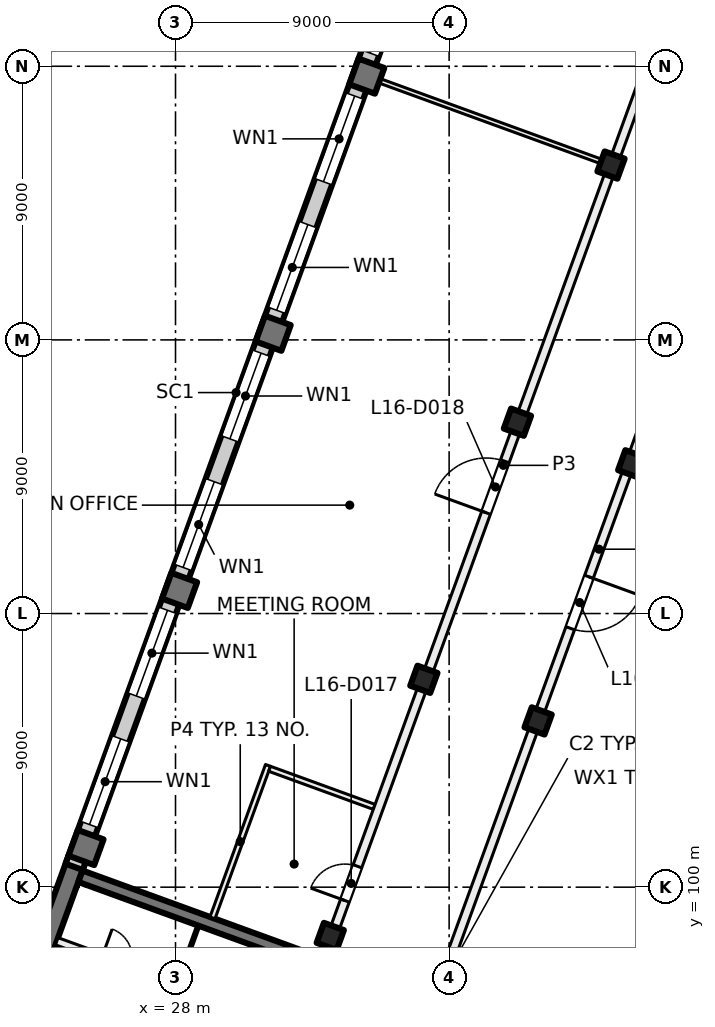
"""IFC4 building model, lengths in metres.
Left out: names, types, materials, properties, quantities, classifications, styles, units other than length and angle.
Written with IfcOpenShell. Run it as: python <this file> out.ifc"""

import sys

from ifc_helpers import new_model, si_unit, direction, frame, frame_2d, origin, origin_2d, place, context, subcontext, project, spatial, rectangle, extrude, element, fill, save


model = new_model("IFC4")
c1 = context("Model", 3, precision=1e-05, world=origin(), true_north=direction((0.0, 1.0)))
c2 = subcontext(c1, "Body", "Model", "MODEL_VIEW")
j1 = project(units=[si_unit("LENGTHUNIT", "METRE"), si_unit("PLANEANGLEUNIT", "RADIAN")], contexts=[c1])
p1 = place(None, origin())
s1 = spatial("IfcSite", under=j1, at=p1, CompositionType="ELEMENT")
p2 = place(p1, origin())
s2 = spatial("IfcBuilding", under=s1, at=p2, CompositionType="ELEMENT")
p3 = place(p2, frame((0.0, 0.0, 71.5)))
s3 = spatial("IfcBuildingStorey", under=s2, at=p3, CompositionType="ELEMENT", Elevation=71.5)
for number, where, z_axis, x_axis in (
    (1, (43.006, 113.925, 0.0), (0.0, 0.0, 1.0), (-0.342, -0.94, 0.0)),
    (2, (39.927, 105.468, 0.0), (0.0, 0.0, 1.0), (-0.342, -0.94, 0.0)),
    (3, (42.325, 123.751, 0.0), (0.0, 0.0, 1.0), (-0.342, -0.94, 0.0)),
    (4, (39.247, 115.293, 0.0), (0.0, 0.0, 1.0), (-0.342, -0.94, 0.0)),
    (5, (36.169, 106.836, 0.0), (0.0, 0.0, 1.0), (-0.342, -0.94, 0.0)),
    (6, (33.091, 98.379, 0.0), (0.0, 0.0, 1.0), (-0.342, -0.94, 0.0)),
):
    element("IfcColumn", number, at=place(p3, frame(where, z_axis=z_axis, x_axis=x_axis)), inside=s3, PredefinedType="COLUMN", context=c2, shape_type="SweptSolid", body=[
        extrude(rectangle(XDim=0.7, YDim=0.7, at=origin_2d()), origin(), (0.0, 0.0, 1.0), 4.0),
    ])
for number, where, z_axis, x_axis in (
    (7, (34.291, 126.675, 0.0), (0.0, 0.0, 1.0), (-0.342, -0.94, 0.0)),
    (8, (31.212, 118.218, 0.0), (0.0, 0.0, 1.0), (-0.342, -0.94, 0.0)),
    (9, (28.134, 109.76, 0.0), (0.0, 0.0, 1.0), (-0.342, -0.94, 0.0)),
    (10, (25.056, 101.303, 0.0), (0.0, 0.0, 1.0), (-0.342, -0.94, 0.0)),
):
    element("IfcColumn", number, at=place(p3, frame(where, z_axis=z_axis, x_axis=x_axis)), inside=s3, PredefinedType="COLUMN", context=c2, shape_type="SweptSolid", body=[
        extrude(rectangle(XDim=0.9, YDim=0.9, at=origin_2d()), origin(), (0.0, 0.0, 1.0), 4.0),
    ])
p4 = place(p3, frame((21.717, 92.568, 0.0), z_axis=(0.0, 0.0, 1.0), x_axis=(0.342016162452, 0.939694069696, 0.0)))
e11 = element("IfcWall", 11, at=p4, inside=s3, PredefinedType="SHEAR", context=c2, shape_type="SweptSolid", body=[
    extrude(rectangle(XDim=8.9, YDim=0.6, at=frame_2d((4.45, 0.0))), origin(), (0.0, 0.0, 1.0), 4.0),
])
p5 = place(p3, frame((32.953, 97.418, 0.0), z_axis=(0.0, 0.0, 1.0), x_axis=(-0.93969060187, 0.342025690201, 0.0)))
e12 = element("IfcWall", 12, at=p5, inside=s3, PredefinedType="SHEAR", context=c2, shape_type="SweptSolid", body=[
    extrude(rectangle(XDim=8.6, YDim=0.4, at=frame_2d((4.3, 0.0))), origin(), (0.0, 0.0, 1.0), 4.0),
])
p6 = place(p3, frame((24.666, 100.669, 0.0), z_axis=(0.0, 0.0, 1.0), x_axis=(0.34201964167, 0.939692803373, 0.0)))
e13 = element("IfcWall", 13, at=p6, inside=s3, PredefinedType="SOLIDWALL", context=c2, shape_type="SweptSolid", body=[
    extrude(rectangle(XDim=32.884, YDim=0.6, at=frame_2d((16.442, 0.0))), origin(), (0.0, 0.0, 1.0), 3.625),
])
p7 = place(p6, frame((1.48, 0.0, 0.9)))
e14 = element("IfcOpeningElement", 14, at=p7, cuts=e13, PredefinedType="OPENING", context=c2, shape_type="SweptSolid", body=[
    extrude(rectangle(XDim=3.0, YDim=2.4, at=frame_2d((1.5, 1.2))), frame((0.0, 0.31, 0.0), z_axis=(0.0, -1.0, 0.0), x_axis=(1.0, 0.0, 0.0)), (0.0, 0.0, 1.0), 0.62),
])
p8 = place(p6, frame((5.98, 0.0, 0.9)))
e15 = element("IfcOpeningElement", 15, at=p8, cuts=e13, PredefinedType="OPENING", context=c2, shape_type="SweptSolid", body=[
    extrude(rectangle(XDim=3.0, YDim=2.4, at=frame_2d((1.5, 1.2))), frame((0.0, 0.31, 0.0), z_axis=(0.0, -1.0, 0.0), x_axis=(1.0, 0.0, 0.0)), (0.0, 0.0, 1.0), 0.62),
])
p9 = place(p6, frame((10.48, 0.0, 0.9)))
e16 = element("IfcOpeningElement", 16, at=p9, cuts=e13, PredefinedType="OPENING", context=c2, shape_type="SweptSolid", body=[
    extrude(rectangle(XDim=3.0, YDim=2.4, at=frame_2d((1.5, 1.2))), frame((0.0, 0.31, 0.0), z_axis=(0.0, -1.0, 0.0), x_axis=(1.0, 0.0, 0.0)), (0.0, 0.0, 1.0), 0.62),
])
p10 = place(p6, frame((14.98, 0.0, 0.9)))
e17 = element("IfcOpeningElement", 17, at=p10, cuts=e13, PredefinedType="OPENING", context=c2, shape_type="SweptSolid", body=[
    extrude(rectangle(XDim=3.0, YDim=2.4, at=frame_2d((1.5, 1.2))), frame((0.0, 0.31, 0.0), z_axis=(0.0, -1.0, 0.0), x_axis=(1.0, 0.0, 0.0)), (0.0, 0.0, 1.0), 0.62),
])
p11 = place(p6, frame((19.48, 0.0, 0.9)))
e18 = element("IfcOpeningElement", 18, at=p11, cuts=e13, PredefinedType="OPENING", context=c2, shape_type="SweptSolid", body=[
    extrude(rectangle(XDim=3.0, YDim=2.4, at=frame_2d((1.5, 1.2))), frame((0.0, 0.31, 0.0), z_axis=(0.0, -1.0, 0.0), x_axis=(1.0, 0.0, 0.0)), (0.0, 0.0, 1.0), 0.62),
])
p12 = place(p6, frame((23.98, 0.0, 0.9)))
e19 = element("IfcOpeningElement", 19, at=p12, cuts=e13, PredefinedType="OPENING", context=c2, shape_type="SweptSolid", body=[
    extrude(rectangle(XDim=3.0, YDim=2.4, at=frame_2d((1.5, 1.2))), frame((0.0, 0.31, 0.0), z_axis=(0.0, -1.0, 0.0), x_axis=(1.0, 0.0, 0.0)), (0.0, 0.0, 1.0), 0.62),
])
p13 = place(p6, frame((28.48, 0.0, 0.9)))
e20 = element("IfcOpeningElement", 20, at=p13, cuts=e13, PredefinedType="OPENING", context=c2, shape_type="SweptSolid", body=[
    extrude(rectangle(XDim=3.0, YDim=2.4, at=frame_2d((1.5, 1.2))), frame((0.0, 0.31, 0.0), z_axis=(0.0, -1.0, 0.0), x_axis=(1.0, 0.0, 0.0)), (0.0, 0.0, 1.0), 0.62),
])
p14 = place(p3, frame((24.094, 98.221, 0.0), z_axis=(0.0, 0.0, 1.0), x_axis=(0.939691552312, -0.342023078919, 0.0)))
e21 = element("IfcWall", 21, at=p14, inside=s3, PredefinedType="PARTITIONING", context=c2, shape_type="SweptSolid", body=[
    extrude(rectangle(XDim=8.4, YDim=0.25, at=frame_2d((4.2, 0.0))), origin(), (0.0, 0.0, 1.0), 3.625),
])
p15 = place(p14, frame((5.925, 0.0, 0.0)))
e22 = element("IfcOpeningElement", 22, at=p15, cuts=e21, PredefinedType="OPENING", context=c2, shape_type="SweptSolid", body=[
    extrude(rectangle(XDim=0.8, YDim=2.1, at=frame_2d((0.4, 1.05))), frame((0.0, 0.135, 0.0), z_axis=(0.0, -1.0, 0.0), x_axis=(1.0, 0.0, 0.0)), (0.0, 0.0, 1.0), 0.27),
])
p16 = place(p14, frame((1.575, 0.0, 0.0)))
e23 = element("IfcOpeningElement", 23, at=p16, cuts=e21, PredefinedType="OPENING", context=c2, shape_type="SweptSolid", body=[
    extrude(rectangle(XDim=1.0, YDim=2.1, at=frame_2d((0.5, 1.05))), frame((0.0, 0.135, 0.0), z_axis=(0.0, -1.0, 0.0), x_axis=(1.0, 0.0, 0.0)), (0.0, 0.0, 1.0), 0.27),
])
p17 = place(p3, frame((28.083, 96.902, 0.0), z_axis=(0.0, 0.0, 1.0), x_axis=(0.342024501273, 0.939691034611, 0.0)))
e24 = element("IfcWall", 24, at=p17, inside=s3, PredefinedType="PARTITIONING", context=c2, shape_type="SweptSolid", body=[
    extrude(rectangle(XDim=1.95, YDim=0.1, at=frame_2d((0.975, 0.0))), origin(), (0.0, 0.0, 1.0), 3.625),
])
p18 = place(p3, frame((29.216, 98.991, 0.0), z_axis=(0.0, 0.0, 1.0), x_axis=(0.342113991093, 0.939658457685, 0.0)))
e25 = element("IfcWall", 25, at=p18, inside=s3, PredefinedType="PARTITIONING", context=c2, shape_type="SweptSolid", body=[
    extrude(rectangle(XDim=5.337, YDim=0.175, at=frame_2d((2.668, 0.0))), origin(), (0.0, 0.0, 1.0), 3.625),
])
p19 = place(p3, frame((31.094, 103.894, 0.0), z_axis=(0.0, 0.0, 1.0), x_axis=(0.939676603928, -0.342064146075, 0.0)))
e26 = element("IfcWall", 26, at=p19, inside=s3, PredefinedType="PARTITIONING", context=c2, shape_type="SweptSolid", body=[
    extrude(rectangle(XDim=3.663, YDim=0.175, at=frame_2d((1.832, 0.0))), origin(), (0.0, 0.0, 1.0), 3.625),
])
p20 = place(p3, frame((32.881, 97.657, 0.0), z_axis=(0.0, 0.0, 1.0), x_axis=(0.342017360004, 0.939693633828, 0.0)))
e27 = element("IfcWall", 27, at=p20, inside=s3, PredefinedType="PARTITIONING", context=c2, shape_type="SweptSolid", body=[
    extrude(rectangle(XDim=34.516, YDim=0.3, at=frame_2d((17.258, 0.0))), origin(), (0.0, 0.0, 1.0), 3.625),
])
p21 = place(p20, frame((2.025, 0.0, 0.0)))
e28 = element("IfcOpeningElement", 28, at=p21, cuts=e27, PredefinedType="OPENING", context=c2, shape_type="SweptSolid", body=[
    extrude(rectangle(XDim=1.2, YDim=2.1, at=frame_2d((0.6, 1.05))), frame((0.0, 0.16, 0.0), z_axis=(0.0, -1.0, 0.0), x_axis=(1.0, 0.0, 0.0)), (0.0, 0.0, 1.0), 0.32),
])
p22 = place(p20, frame((15.6, 0.0, 0.0)))
e29 = element("IfcOpeningElement", 29, at=p22, cuts=e27, PredefinedType="OPENING", context=c2, shape_type="SweptSolid", body=[
    extrude(rectangle(XDim=1.8, YDim=2.1, at=frame_2d((0.9, 1.05))), frame((0.0, 0.16, 0.0), z_axis=(0.0, -1.0, 0.0), x_axis=(1.0, 0.0, 0.0)), (0.0, 0.0, 1.0), 0.32),
])
p23 = place(p3, frame((42.231, 123.785, 0.0), z_axis=(0.0, 0.0, 1.0), x_axis=(-0.939687752599, 0.342033518263, 0.0)))
e30 = element("IfcWall", 30, at=p23, inside=s3, PredefinedType="PARTITIONING", context=c2, shape_type="SweptSolid", body=[
    extrude(rectangle(XDim=8.301, YDim=0.15, at=frame_2d((4.15, 0.0))), origin(), (0.0, 0.0, 1.0), 3.625),
])
p24 = place(p3, frame((47.314, 125.909, 0.0), z_axis=(0.0, 0.0, 1.0), x_axis=(-0.342010770371, -0.939696032209, 0.0)))
e31 = element("IfcWall", 31, at=p24, inside=s3, PredefinedType="PARTITIONING", context=c2, shape_type="SweptSolid", body=[
    extrude(rectangle(XDim=31.485, YDim=0.3, at=frame_2d((15.742, 0.0))), origin(), (0.0, 0.0, 1.0), 3.625),
])
p25 = place(p24, frame((16.709, 0.0, 0.0)))
e32 = element("IfcOpeningElement", 32, at=p25, cuts=e31, PredefinedType="OPENING", context=c2, shape_type="SweptSolid", body=[
    extrude(rectangle(XDim=1.8, YDim=2.1, at=frame_2d((0.9, 1.05))), frame((0.0, 0.16, 0.0), z_axis=(0.0, -1.0, 0.0), x_axis=(1.0, 0.0, 0.0)), (0.0, 0.0, 1.0), 0.32),
])
p26 = place(p7, origin())
e33 = element("IfcWindow", 33, at=p26, inside=s3, PartitioningType="SINGLE_PANEL", PredefinedType="WINDOW", context=c2, shape_type="SweptSolid", body=[
    extrude(rectangle(XDim=3.0, YDim=2.4, at=frame_2d((1.5, 1.2))), frame((0.0, 0.03, 0.0), z_axis=(0.0, -1.0, 0.0), x_axis=(1.0, 0.0, 0.0)), (0.0, 0.0, 1.0), 0.06),
])
fill(e14, e33)
p27 = place(p8, origin())
e34 = element("IfcWindow", 34, at=p27, inside=s3, PartitioningType="SINGLE_PANEL", PredefinedType="WINDOW", context=c2, shape_type="SweptSolid", body=[
    extrude(rectangle(XDim=3.0, YDim=2.4, at=frame_2d((1.5, 1.2))), frame((0.0, 0.03, 0.0), z_axis=(0.0, -1.0, 0.0), x_axis=(1.0, 0.0, 0.0)), (0.0, 0.0, 1.0), 0.06),
])
fill(e15, e34)
p28 = place(p9, origin())
e35 = element("IfcWindow", 35, at=p28, inside=s3, PartitioningType="SINGLE_PANEL", PredefinedType="WINDOW", context=c2, shape_type="SweptSolid", body=[
    extrude(rectangle(XDim=3.0, YDim=2.4, at=frame_2d((1.5, 1.2))), frame((0.0, 0.03, 0.0), z_axis=(0.0, -1.0, 0.0), x_axis=(1.0, 0.0, 0.0)), (0.0, 0.0, 1.0), 0.06),
])
fill(e16, e35)
p29 = place(p10, origin())
e36 = element("IfcWindow", 36, at=p29, inside=s3, PartitioningType="SINGLE_PANEL", PredefinedType="WINDOW", context=c2, shape_type="SweptSolid", body=[
    extrude(rectangle(XDim=3.0, YDim=2.4, at=frame_2d((1.5, 1.2))), frame((0.0, 0.03, 0.0), z_axis=(0.0, -1.0, 0.0), x_axis=(1.0, 0.0, 0.0)), (0.0, 0.0, 1.0), 0.06),
])
fill(e17, e36)
p30 = place(p11, origin())
e37 = element("IfcWindow", 37, at=p30, inside=s3, PartitioningType="SINGLE_PANEL", PredefinedType="WINDOW", context=c2, shape_type="SweptSolid", body=[
    extrude(rectangle(XDim=3.0, YDim=2.4, at=frame_2d((1.5, 1.2))), frame((0.0, 0.03, 0.0), z_axis=(0.0, -1.0, 0.0), x_axis=(1.0, 0.0, 0.0)), (0.0, 0.0, 1.0), 0.06),
])
fill(e18, e37)
p31 = place(p12, origin())
e38 = element("IfcWindow", 38, at=p31, inside=s3, PartitioningType="SINGLE_PANEL", PredefinedType="WINDOW", context=c2, shape_type="SweptSolid", body=[
    extrude(rectangle(XDim=3.0, YDim=2.4, at=frame_2d((1.5, 1.2))), frame((0.0, 0.03, 0.0), z_axis=(0.0, -1.0, 0.0), x_axis=(1.0, 0.0, 0.0)), (0.0, 0.0, 1.0), 0.06),
])
fill(e19, e38)
p32 = place(p13, origin())
e39 = element("IfcWindow", 39, at=p32, inside=s3, PartitioningType="SINGLE_PANEL", PredefinedType="WINDOW", context=c2, shape_type="SweptSolid", body=[
    extrude(rectangle(XDim=3.0, YDim=2.4, at=frame_2d((1.5, 1.2))), frame((0.0, 0.03, 0.0), z_axis=(0.0, -1.0, 0.0), x_axis=(1.0, 0.0, 0.0)), (0.0, 0.0, 1.0), 0.06),
])
fill(e20, e39)
p33 = place(p21, origin())
e40 = element("IfcDoor", 40, at=p33, inside=s3, OperationType="DOUBLE_DOOR_SINGLE_SWING", PredefinedType="DOOR", context=c2, shape_type="SweptSolid", body=[
    extrude(rectangle(XDim=1.2, YDim=2.1, at=frame_2d((0.6, 1.05))), frame((0.0, 0.025, 0.0), z_axis=(0.0, -1.0, 0.0), x_axis=(1.0, 0.0, 0.0)), (0.0, 0.0, 1.0), 0.05),
])
fill(e28, e40)
p34 = place(p22, origin())
e41 = element("IfcDoor", 41, at=p34, inside=s3, OperationType="DOUBLE_DOOR_SINGLE_SWING", PredefinedType="DOOR", context=c2, shape_type="SweptSolid", body=[
    extrude(rectangle(XDim=1.8, YDim=2.1, at=frame_2d((0.9, 1.05))), frame((0.0, 0.025, 0.0), z_axis=(0.0, -1.0, 0.0), x_axis=(1.0, 0.0, 0.0)), (0.0, 0.0, 1.0), 0.05),
])
fill(e29, e41)
p35 = place(p25, origin())
e42 = element("IfcDoor", 42, at=p35, inside=s3, OperationType="DOUBLE_DOOR_SINGLE_SWING", PredefinedType="DOOR", context=c2, shape_type="SweptSolid", body=[
    extrude(rectangle(XDim=1.8, YDim=2.1, at=frame_2d((0.9, 1.05))), frame((0.0, 0.025, 0.0), z_axis=(0.0, -1.0, 0.0), x_axis=(1.0, 0.0, 0.0)), (0.0, 0.0, 1.0), 0.05),
])
fill(e32, e42)
save(model, sys.argv[1])
